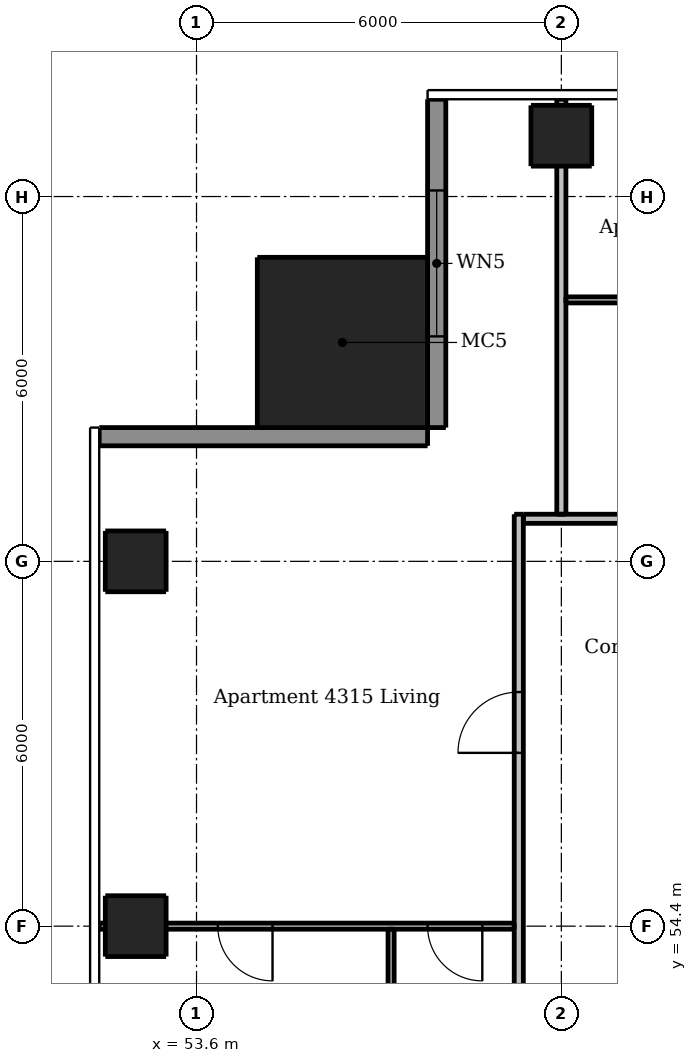
"""IFC4 building model, lengths in metres.
Left out: names, types, materials, properties, quantities, classifications, styles, units other than length and angle.
Written with IfcOpenShell. Run it as: python <this file> out.ifc"""

import sys

from ifc_helpers import new_model, si_unit, direction, frame, frame_2d, origin, origin_2d, place, context, subcontext, project, spatial, rectangle, extrude, element, fill, save


model = new_model("IFC4")
c1 = context("Model", 3, precision=1e-05, world=origin(), true_north=direction((0.0, 1.0)))
c2 = subcontext(c1, "Body", "Model", "MODEL_VIEW")
j1 = project(units=[si_unit("LENGTHUNIT", "METRE"), si_unit("PLANEANGLEUNIT", "RADIAN")], contexts=[c1])
p1 = place(None, origin())
s1 = spatial("IfcSite", under=j1, at=p1, CompositionType="ELEMENT")
p2 = place(p1, origin())
s2 = spatial("IfcBuilding", under=s1, at=p2, CompositionType="ELEMENT")
p3 = place(p2, frame((0.0, 0.0, 161.5)))
s3 = spatial("IfcBuildingStorey", under=s2, at=p3, CompositionType="ELEMENT", Elevation=161.5)
for number, where, z_axis, x_axis in (
    (1, (59.6, 67.4, 0.0), (0.0, 0.0, 1.0), (1.0, 0.0, 0.0)),
    (2, (52.6, 54.4, 0.0), (0.0, 0.0, 1.0), (1.0, 0.0, 0.0)),
    (3, (52.6, 60.4, 0.0), (0.0, 0.0, 1.0), (1.0, 0.0, 0.0)),
):
    element("IfcColumn", number, at=place(p3, frame(where, z_axis=z_axis, x_axis=x_axis)), inside=s3, PredefinedType="COLUMN", context=c2, shape_type="SweptSolid", body=[
        extrude(rectangle(XDim=1.0, YDim=1.0, at=origin_2d()), origin(), (0.0, 0.0, 1.0), 3.05),
    ])
p4 = place(p3, frame((56.0, 64.0, 0.0), z_axis=(0.0, 0.0, 1.0), x_axis=(1.0, 0.0, 0.0)))
e4 = element("IfcColumn", 4, at=p4, inside=s3, PredefinedType="COLUMN", context=c2, shape_type="SweptSolid", body=[
    extrude(rectangle(XDim=2.8, YDim=2.8, at=origin_2d()), origin(), (0.0, 0.0, 1.0), 3.3),
])
p5 = place(p3, frame((57.55, 68.0, 0.0), z_axis=(0.0, 0.0, 1.0), x_axis=(0.0, -1.0, 0.0)))
e5 = element("IfcWall", 5, at=p5, inside=s3, PredefinedType="SOLIDWALL", context=c2, shape_type="SweptSolid", body=[
    extrude(rectangle(XDim=5.4, YDim=0.3, at=frame_2d((2.7, 0.0))), origin(), (0.0, 0.0, 1.0), 3.05),
])
p6 = place(p5, frame((1.5, 0.0, 0.15)))
e6 = element("IfcOpeningElement", 6, at=p6, cuts=e5, PredefinedType="OPENING", context=c2, shape_type="SweptSolid", body=[
    extrude(rectangle(XDim=2.4, YDim=2.1, at=frame_2d((1.2, 1.05))), frame((0.0, 0.16, 0.0), z_axis=(0.0, -1.0, 0.0), x_axis=(1.0, 0.0, 0.0)), (0.0, 0.0, 1.0), 0.32),
])
p7 = place(p3, frame((57.4, 62.45, 0.0), z_axis=(0.0, 0.0, 1.0), x_axis=(-1.0, 0.0, 0.0)))
e7 = element("IfcWall", 7, at=p7, inside=s3, PredefinedType="SOLIDWALL", context=c2, shape_type="SweptSolid", body=[
    extrude(rectangle(XDim=5.4, YDim=0.3, at=frame_2d((2.7, 0.0))), origin(), (0.0, 0.0, 1.0), 3.05),
])
p8 = place(p3, frame((56.8, 54.35, 0.0), z_axis=(0.0, 0.0, 1.0), x_axis=(0.0, -1.0, 0.0)))
e8 = element("IfcWall", 8, at=p8, inside=s3, PredefinedType="PARTITIONING", context=c2, shape_type="SweptSolid", body=[
    extrude(rectangle(XDim=5.875, YDim=0.1, at=frame_2d((2.938, 0.0))), origin(), (0.0, 0.0, 1.0), 3.05),
])
p9 = place(p8, frame((3.75, 0.0, 0.0)))
e9 = element("IfcOpeningElement", 9, at=p9, cuts=e8, PredefinedType="OPENING", context=c2, shape_type="SweptSolid", body=[
    extrude(rectangle(XDim=0.8, YDim=2.1, at=frame_2d((0.4, 1.05))), frame((0.0, 0.06, 0.0), z_axis=(0.0, -1.0, 0.0), x_axis=(1.0, 0.0, 0.0)), (0.0, 0.0, 1.0), 0.12),
])
p10 = place(p3, frame((59.675, 64.7, 0.0), z_axis=(0.0, 0.0, 1.0), x_axis=(1.0, 0.0, 0.0)))
e10 = element("IfcWall", 10, at=p10, inside=s3, PredefinedType="PARTITIONING", context=c2, shape_type="SweptSolid", body=[
    extrude(rectangle(XDim=1.975, YDim=0.1, at=frame_2d((0.987, 0.0))), origin(), (0.0, 0.0, 1.0), 3.05),
])
p11 = place(p3, frame((58.825, 54.4, 0.0), z_axis=(0.0, 0.0, 1.0), x_axis=(-1.0, 0.0, 0.0)))
e11 = element("IfcWall", 11, at=p11, inside=s3, PredefinedType="PARTITIONING", context=c2, shape_type="SweptSolid", body=[
    extrude(rectangle(XDim=6.825, YDim=0.1, at=frame_2d((3.413, 0.0))), origin(), (0.0, 0.0, 1.0), 2.516),
])
p12 = place(p11, frame((0.525, 0.0, 0.0)))
e12 = element("IfcOpeningElement", 12, at=p12, cuts=e11, PredefinedType="OPENING", context=c2, shape_type="SweptSolid", body=[
    extrude(rectangle(XDim=0.9, YDim=2.1, at=frame_2d((0.45, 1.05))), frame((0.0, 0.06, 0.0), z_axis=(0.0, -1.0, 0.0), x_axis=(1.0, 0.0, 0.0)), (0.0, 0.0, 1.0), 0.12),
])
p13 = place(p11, frame((3.975, 0.0, 0.0)))
e13 = element("IfcOpeningElement", 13, at=p13, cuts=e11, PredefinedType="OPENING", context=c2, shape_type="SweptSolid", body=[
    extrude(rectangle(XDim=0.9, YDim=2.1, at=frame_2d((0.45, 1.05))), frame((0.0, 0.06, 0.0), z_axis=(0.0, -1.0, 0.0), x_axis=(1.0, 0.0, 0.0)), (0.0, 0.0, 1.0), 0.12),
])
p14 = place(p3, frame((58.9, 30.325, 0.0), z_axis=(0.0, 0.0, 1.0), x_axis=(0.0, 1.0, 0.0)))
e14 = element("IfcWall", 14, at=p14, inside=s3, PredefinedType="PARTITIONING", context=c2, shape_type="SweptSolid", body=[
    extrude(rectangle(XDim=30.85, YDim=0.15, at=frame_2d((15.425, 0.0))), origin(), (0.0, 0.0, 1.0), 3.05),
])
p15 = place(p14, frame((2.575, 0.0, 0.0)))
e15 = element("IfcOpeningElement", 15, at=p15, cuts=e14, PredefinedType="OPENING", context=c2, shape_type="SweptSolid", body=[
    extrude(rectangle(XDim=1.0, YDim=2.1, at=frame_2d((0.5, 1.05))), frame((0.0, 0.085, 0.0), z_axis=(0.0, -1.0, 0.0), x_axis=(1.0, 0.0, 0.0)), (0.0, 0.0, 1.0), 0.17),
])
p16 = place(p14, frame((8.575, 0.0, 0.0)))
e16 = element("IfcOpeningElement", 16, at=p16, cuts=e14, PredefinedType="OPENING", context=c2, shape_type="SweptSolid", body=[
    extrude(rectangle(XDim=1.0, YDim=2.1, at=frame_2d((0.5, 1.05))), frame((0.0, 0.085, 0.0), z_axis=(0.0, -1.0, 0.0), x_axis=(1.0, 0.0, 0.0)), (0.0, 0.0, 1.0), 0.17),
])
p17 = place(p14, frame((14.575, 0.0, 0.0)))
e17 = element("IfcOpeningElement", 17, at=p17, cuts=e14, PredefinedType="OPENING", context=c2, shape_type="SweptSolid", body=[
    extrude(rectangle(XDim=1.0, YDim=2.1, at=frame_2d((0.5, 1.05))), frame((0.0, 0.085, 0.0), z_axis=(0.0, -1.0, 0.0), x_axis=(1.0, 0.0, 0.0)), (0.0, 0.0, 1.0), 0.17),
])
p18 = place(p14, frame((26.925, 0.0, 0.0)))
e18 = element("IfcOpeningElement", 18, at=p18, cuts=e14, PredefinedType="OPENING", context=c2, shape_type="SweptSolid", body=[
    extrude(rectangle(XDim=1.0, YDim=2.1, at=frame_2d((0.5, 1.05))), frame((0.0, 0.085, 0.0), z_axis=(0.0, -1.0, 0.0), x_axis=(1.0, 0.0, 0.0)), (0.0, 0.0, 1.0), 0.17),
])
p19 = place(p3, frame((59.6, 61.175, 0.0), z_axis=(0.0, 0.0, 1.0), x_axis=(0.0, 1.0, 0.0)))
e19 = element("IfcWall", 19, at=p19, inside=s3, PredefinedType="PARTITIONING", context=c2, shape_type="SweptSolid", body=[
    extrude(rectangle(XDim=6.825, YDim=0.15, at=frame_2d((3.413, 0.0))), origin(), (0.0, 0.0, 1.0), 2.51),
])
p20 = place(p3, frame((58.975, 61.1, 0.0), z_axis=(0.0, 0.0, 1.0), x_axis=(1.0, 0.0, 0.0)))
e20 = element("IfcWall", 20, at=p20, inside=s3, PredefinedType="PARTITIONING", context=c2, shape_type="SweptSolid", body=[
    extrude(rectangle(XDim=29.25, YDim=0.15, at=frame_2d((14.625, 0.0))), origin(), (0.0, 0.0, 1.0), 3.05),
])
p21 = place(p20, frame((3.125, 0.0, 0.0)))
e21 = element("IfcOpeningElement", 21, at=p21, cuts=e20, PredefinedType="OPENING", context=c2, shape_type="SweptSolid", body=[
    extrude(rectangle(XDim=1.0, YDim=2.1, at=frame_2d((0.5, 1.05))), frame((0.0, 0.085, 0.0), z_axis=(0.0, -1.0, 0.0), x_axis=(1.0, 0.0, 0.0)), (0.0, 0.0, 1.0), 0.17),
])
p22 = place(p20, frame((9.125, 0.0, 0.0)))
e22 = element("IfcOpeningElement", 22, at=p22, cuts=e20, PredefinedType="OPENING", context=c2, shape_type="SweptSolid", body=[
    extrude(rectangle(XDim=1.0, YDim=2.1, at=frame_2d((0.5, 1.05))), frame((0.0, 0.085, 0.0), z_axis=(0.0, -1.0, 0.0), x_axis=(1.0, 0.0, 0.0)), (0.0, 0.0, 1.0), 0.17),
])
p23 = place(p20, frame((15.125, 0.0, 0.0)))
e23 = element("IfcOpeningElement", 23, at=p23, cuts=e20, PredefinedType="OPENING", context=c2, shape_type="SweptSolid", body=[
    extrude(rectangle(XDim=1.0, YDim=2.1, at=frame_2d((0.5, 1.05))), frame((0.0, 0.085, 0.0), z_axis=(0.0, -1.0, 0.0), x_axis=(1.0, 0.0, 0.0)), (0.0, 0.0, 1.0), 0.17),
])
p24 = place(p20, frame((26.475, 0.0, 0.0)))
e24 = element("IfcOpeningElement", 24, at=p24, cuts=e20, PredefinedType="OPENING", context=c2, shape_type="SweptSolid", body=[
    extrude(rectangle(XDim=1.0, YDim=2.1, at=frame_2d((0.5, 1.05))), frame((0.0, 0.085, 0.0), z_axis=(0.0, -1.0, 0.0), x_axis=(1.0, 0.0, 0.0)), (0.0, 0.0, 1.0), 0.17),
])
p25 = place(p6, origin())
e25 = element("IfcWindow", 25, at=p25, inside=s3, PartitioningType="DOUBLE_PANEL_VERTICAL", PredefinedType="WINDOW", context=c2, shape_type="SweptSolid", body=[
    extrude(rectangle(XDim=2.4, YDim=2.1, at=frame_2d((1.2, 1.05))), frame((0.0, 0.03, 0.0), z_axis=(0.0, -1.0, 0.0), x_axis=(1.0, 0.0, 0.0)), (0.0, 0.0, 1.0), 0.06),
])
fill(e6, e25)
p26 = place(p18, origin())
e26 = element("IfcDoor", 26, at=p26, inside=s3, OperationType="SINGLE_SWING_LEFT", PredefinedType="DOOR", context=c2, shape_type="SweptSolid", body=[
    extrude(rectangle(XDim=1.0, YDim=2.1, at=frame_2d((0.5, 1.05))), frame((0.0, 0.025, 0.0), z_axis=(0.0, -1.0, 0.0), x_axis=(1.0, 0.0, 0.0)), (0.0, 0.0, 1.0), 0.05),
])
fill(e18, e26)
p27 = place(p12, origin())
e27 = element("IfcDoor", 27, at=p27, inside=s3, OperationType="SINGLE_SWING_LEFT", PredefinedType="DOOR", context=c2, shape_type="SweptSolid", body=[
    extrude(rectangle(XDim=0.9, YDim=2.1, at=frame_2d((0.45, 1.05))), frame((0.0, 0.025, 0.0), z_axis=(0.0, -1.0, 0.0), x_axis=(1.0, 0.0, 0.0)), (0.0, 0.0, 1.0), 0.05),
])
fill(e12, e27)
p28 = place(p13, origin())
e28 = element("IfcDoor", 28, at=p28, inside=s3, OperationType="SINGLE_SWING_LEFT", PredefinedType="DOOR", context=c2, shape_type="SweptSolid", body=[
    extrude(rectangle(XDim=0.9, YDim=2.1, at=frame_2d((0.45, 1.05))), frame((0.0, 0.025, 0.0), z_axis=(0.0, -1.0, 0.0), x_axis=(1.0, 0.0, 0.0)), (0.0, 0.0, 1.0), 0.05),
])
fill(e13, e28)
save(model, sys.argv[1])
